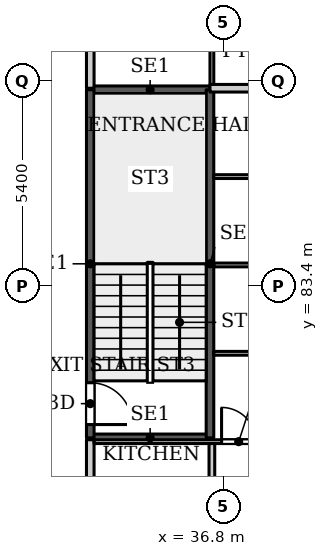
"""IFC4 building model, lengths in metres.
Left out: names, types, materials, properties, quantities, classifications, styles, units other than length and angle.
Written with IfcOpenShell. Run it as: python <this file> out.ifc"""

import sys

from ifc_helpers import new_model, si_unit, direction, frame, frame_2d, origin, place, context, subcontext, project, spatial, rectangle, extrude, source, transform, mapped, element, fill, save


model = new_model("IFC4")
c1 = context("Model", 3, precision=1e-05, world=origin(), true_north=direction((0.0, 1.0)))
c2 = subcontext(c1, "Body", "Model", "MODEL_VIEW")
j1 = project(units=[si_unit("LENGTHUNIT", "METRE"), si_unit("PLANEANGLEUNIT", "RADIAN")], contexts=[c1])
p1 = place(None, origin())
s1 = spatial("IfcSite", under=j1, at=p1, CompositionType="ELEMENT")
p2 = place(p1, origin())
s2 = spatial("IfcBuilding", under=s1, at=p2, CompositionType="ELEMENT")
p3 = place(p2, frame((0.0, 0.0, 69.5)))
s3 = spatial("IfcBuildingStorey", under=s2, at=p3, CompositionType="ELEMENT", Elevation=69.5)
for number, where, z_axis, x_axis in (
    (1, (33.3, 79.4, 0.0), (0.0, 0.0, 1.0), (1.0, 0.0, 0.0)),
    (2, (33.3, 88.56, 0.0), (0.0, 0.0, 1.0), (1.0, 0.0, 0.0)),
):
    element("IfcWall", number, at=place(p3, frame(where, z_axis=z_axis, x_axis=x_axis)), inside=s3, PredefinedType="SHEAR", context=c2, shape_type="SweptSolid", body=[
        extrude(rectangle(XDim=3.15, YDim=0.2, at=frame_2d((1.575, 0.0))), origin(), (0.0, 0.0, 1.0), 3.9),
    ])
p4 = place(p3, frame((33.3, 79.4, 0.0), z_axis=(0.0, 0.0, 1.0), x_axis=(0.0, 1.0, 0.0)))
e3 = element("IfcWall", 3, at=p4, inside=s3, PredefinedType="SHEAR", context=c2, shape_type="SweptSolid", body=[
    extrude(rectangle(XDim=9.16, YDim=0.2, at=frame_2d((4.58, 0.0))), origin(), (0.0, 0.0, 1.0), 3.9),
])
p5 = place(p4, frame((0.35, 0.0, 0.0)))
e4 = element("IfcOpeningElement", 4, at=p5, cuts=e3, PredefinedType="OPENING", context=c2, shape_type="SweptSolid", body=[
    extrude(rectangle(XDim=1.1, YDim=2.2, at=frame_2d((0.55, 1.1))), frame((0.0, 0.11, 0.0), z_axis=(0.0, -1.0, 0.0), x_axis=(1.0, 0.0, 0.0)), (0.0, 0.0, 1.0), 0.22),
])
p6 = place(p3, frame((36.45, 79.4, 0.0), z_axis=(0.0, 0.0, 1.0), x_axis=(0.0, 1.0, 0.0)))
e5 = element("IfcWall", 5, at=p6, inside=s3, PredefinedType="SHEAR", context=c2, shape_type="SweptSolid", body=[
    extrude(rectangle(XDim=9.16, YDim=0.2, at=frame_2d((4.58, 0.0))), origin(), (0.0, 0.0, 1.0), 3.9),
])
p7 = place(p3, frame((33.3, 54.4, 0.0), z_axis=(0.0, 0.0, 1.0), x_axis=(0.0, 1.0, 0.0)))
e6 = element("IfcWall", 6, at=p7, inside=s3, PredefinedType="PARTITIONING", context=c2, shape_type="SweptSolid", body=[
    extrude(rectangle(XDim=24.95, YDim=0.2, at=frame_2d((12.475, 0.0))), origin(), (0.0, 0.0, 1.0), 3.6),
])
p8 = place(p7, frame((3.4, 0.0, 0.0)))
e7 = element("IfcOpeningElement", 7, at=p8, cuts=e6, PredefinedType="OPENING", context=c2, shape_type="SweptSolid", body=[
    extrude(rectangle(XDim=1.0, YDim=2.1, at=frame_2d((0.5, 1.05))), frame((0.0, 0.11, 0.0), z_axis=(0.0, -1.0, 0.0), x_axis=(1.0, 0.0, 0.0)), (0.0, 0.0, 1.0), 0.22),
])
p9 = place(p3, frame((33.3, 88.6, 0.0), z_axis=(0.0, 0.0, 1.0), x_axis=(0.0, 1.0, 0.0)))
e8 = element("IfcWall", 8, at=p9, inside=s3, PredefinedType="PARTITIONING", context=c2, shape_type="SweptSolid", body=[
    extrude(rectangle(XDim=5.175, YDim=0.2, at=frame_2d((2.587, 0.0))), origin(), (0.0, 0.0, 1.0), 3.6),
])
p10 = place(p9, frame((3.7, 0.0, 0.0)))
e9 = element("IfcOpeningElement", 9, at=p10, cuts=e8, PredefinedType="OPENING", context=c2, shape_type="SweptSolid", body=[
    extrude(rectangle(XDim=1.0, YDim=2.1, at=frame_2d((0.5, 1.05))), frame((0.0, 0.11, 0.0), z_axis=(0.0, -1.0, 0.0), x_axis=(1.0, 0.0, 0.0)), (0.0, 0.0, 1.0), 0.22),
])
p11 = place(p3, frame((33.4, 79.3, 0.0), z_axis=(0.0, 0.0, 1.0), x_axis=(1.0, 0.0, 0.0)))
e10 = element("IfcWall", 10, at=p11, inside=s3, PredefinedType="PARTITIONING", context=c2, shape_type="SweptSolid", body=[
    extrude(rectangle(XDim=12.5, YDim=0.1, at=frame_2d((6.25, 0.0))), origin(), (0.0, 0.0, 1.0), 3.6),
])
p12 = place(p11, frame((3.355, 0.0, 0.0)))
e11 = element("IfcOpeningElement", 11, at=p12, cuts=e10, PredefinedType="OPENING", context=c2, shape_type="SweptSolid", body=[
    extrude(rectangle(XDim=0.9, YDim=2.1, at=frame_2d((0.45, 1.05))), frame((0.0, 0.06, 0.0), z_axis=(0.0, -1.0, 0.0), x_axis=(1.0, 0.0, 0.0)), (0.0, 0.0, 1.0), 0.12),
])
p13 = place(p3, frame((36.45, 88.6, 0.0), z_axis=(0.0, 0.0, 1.0), x_axis=(1.0, 0.0, 0.0)))
e12 = element("IfcWall", 12, at=p13, inside=s3, PredefinedType="PARTITIONING", context=c2, shape_type="SweptSolid", body=[
    extrude(rectangle(XDim=9.45, YDim=0.2, at=frame_2d((4.725, 0.0))), origin(), (0.0, 0.0, 1.0), 3.147),
])
p14 = place(p3, frame((36.5, 60.325, 0.0), z_axis=(0.0, 0.0, 1.0), x_axis=(0.0, 1.0, 0.0)))
e13 = element("IfcWall", 13, at=p14, inside=s3, PredefinedType="PARTITIONING", context=c2, shape_type="SweptSolid", body=[
    extrude(rectangle(XDim=18.925, YDim=0.15, at=frame_2d((9.462, 0.0))), origin(), (0.0, 0.0, 1.0), 3.6),
])
p15 = place(p14, frame((8.075, 0.0, 0.0)))
e14 = element("IfcOpeningElement", 14, at=p15, cuts=e13, PredefinedType="OPENING", context=c2, shape_type="SweptSolid", body=[
    extrude(rectangle(XDim=0.8, YDim=2.1, at=frame_2d((0.4, 1.05))), frame((0.0, 0.085, 0.0), z_axis=(0.0, -1.0, 0.0), x_axis=(1.0, 0.0, 0.0)), (0.0, 0.0, 1.0), 0.17),
])
p16 = place(p14, frame((15.425, 0.0, 0.0)))
e15 = element("IfcOpeningElement", 15, at=p16, cuts=e13, PredefinedType="OPENING", context=c2, shape_type="SweptSolid", body=[
    extrude(rectangle(XDim=0.9, YDim=2.1, at=frame_2d((0.45, 1.05))), frame((0.0, 0.085, 0.0), z_axis=(0.0, -1.0, 0.0), x_axis=(1.0, 0.0, 0.0)), (0.0, 0.0, 1.0), 0.17),
])
p17 = place(p14, frame((12.275, 0.0, 0.0)))
e16 = element("IfcOpeningElement", 16, at=p17, cuts=e13, PredefinedType="OPENING", context=c2, shape_type="SweptSolid", body=[
    extrude(rectangle(XDim=0.8, YDim=2.1, at=frame_2d((0.4, 1.05))), frame((0.0, 0.085, 0.0), z_axis=(0.0, -1.0, 0.0), x_axis=(1.0, 0.0, 0.0)), (0.0, 0.0, 1.0), 0.17),
])
p18 = place(p14, frame((1.675, 0.0, 0.0)))
e17 = element("IfcOpeningElement", 17, at=p18, cuts=e13, PredefinedType="OPENING", context=c2, shape_type="SweptSolid", body=[
    extrude(rectangle(XDim=0.8, YDim=2.1, at=frame_2d((0.4, 1.05))), frame((0.0, 0.085, 0.0), z_axis=(0.0, -1.0, 0.0), x_axis=(1.0, 0.0, 0.0)), (0.0, 0.0, 1.0), 0.17),
])
p19 = place(p3, frame((36.5, 88.7, 0.0), z_axis=(0.0, 0.0, 1.0), x_axis=(0.0, 1.0, 0.0)))
e18 = element("IfcWall", 18, at=p19, inside=s3, PredefinedType="PARTITIONING", context=c2, shape_type="SweptSolid", body=[
    extrude(rectangle(XDim=3.25, YDim=0.1, at=frame_2d((1.625, 0.0))), origin(), (0.0, 0.0, 1.0), 3.6),
])
p20 = place(p19, frame((1.1, 0.0, 0.0)))
e19 = element("IfcOpeningElement", 19, at=p20, cuts=e18, PredefinedType="OPENING", context=c2, shape_type="SweptSolid", body=[
    extrude(rectangle(XDim=0.9, YDim=2.1, at=frame_2d((0.45, 1.05))), frame((0.0, 0.06, 0.0), z_axis=(0.0, -1.0, 0.0), x_axis=(1.0, 0.0, 0.0)), (0.0, 0.0, 1.0), 0.12),
])
p21 = place(p3, frame((36.549, 81.625, 0.0), z_axis=(0.0, 0.0, 1.0), x_axis=(1.0, 0.0, 0.0)))
e20 = element("IfcWall", 20, at=p21, inside=s3, PredefinedType="PARTITIONING", context=c2, shape_type="SweptSolid", body=[
    extrude(rectangle(XDim=9.351, YDim=0.1, at=frame_2d((4.675, 0.0))), origin(), (0.0, 0.0, 1.0), 3.6),
])
p22 = place(p21, frame((4.176, 0.0, 0.0)))
e21 = element("IfcOpeningElement", 21, at=p22, cuts=e20, PredefinedType="OPENING", context=c2, shape_type="SweptSolid", body=[
    extrude(rectangle(XDim=0.9, YDim=2.1, at=frame_2d((0.45, 1.05))), frame((0.0, 0.06, 0.0), z_axis=(0.0, -1.0, 0.0), x_axis=(1.0, 0.0, 0.0)), (0.0, 0.0, 1.0), 0.12),
])
p23 = place(p3, frame((36.549, 83.95, 0.0), z_axis=(0.0, 0.0, 1.0), x_axis=(1.0, 0.0, 0.0)))
e22 = element("IfcWall", 22, at=p23, inside=s3, PredefinedType="PARTITIONING", context=c2, shape_type="SweptSolid", body=[
    extrude(rectangle(XDim=9.351, YDim=0.1, at=frame_2d((4.675, 0.0))), origin(), (0.0, 0.0, 1.0), 3.6),
])
p24 = place(p23, frame((4.176, 0.0, 0.0)))
e23 = element("IfcOpeningElement", 23, at=p24, cuts=e22, PredefinedType="OPENING", context=c2, shape_type="SweptSolid", body=[
    extrude(rectangle(XDim=0.9, YDim=2.1, at=frame_2d((0.45, 1.05))), frame((0.0, 0.06, 0.0), z_axis=(0.0, -1.0, 0.0), x_axis=(1.0, 0.0, 0.0)), (0.0, 0.0, 1.0), 0.12),
])
p25 = place(p3, frame((36.549, 86.275, 0.0), z_axis=(0.0, 0.0, 1.0), x_axis=(1.0, 0.0, 0.0)))
e24 = element("IfcWall", 24, at=p25, inside=s3, PredefinedType="PARTITIONING", context=c2, shape_type="SweptSolid", body=[
    extrude(rectangle(XDim=9.351, YDim=0.1, at=frame_2d((4.675, 0.0))), origin(), (0.0, 0.0, 1.0), 3.6),
])
p26 = place(p25, frame((4.176, 0.0, 0.0)))
e25 = element("IfcOpeningElement", 25, at=p26, cuts=e24, PredefinedType="OPENING", context=c2, shape_type="SweptSolid", body=[
    extrude(rectangle(XDim=0.9, YDim=2.1, at=frame_2d((0.45, 1.05))), frame((0.0, 0.06, 0.0), z_axis=(0.0, -1.0, 0.0), x_axis=(1.0, 0.0, 0.0)), (0.0, 0.0, 1.0), 0.12),
])
m1 = source(origin(), c2, "Body", "SweptSolid", [
    extrude(rectangle(XDim=1.1, YDim=2.2, at=frame_2d((0.55, 1.1))), frame((0.0, 0.025, 0.0), z_axis=(0.0, -1.0, 0.0), x_axis=(1.0, 0.0, 0.0)), (0.0, 0.0, 1.0), 0.05),
])
p27 = place(p5, origin())
e26 = element("IfcDoor", 26, at=p27, inside=s3, OperationType="SINGLE_SWING_RIGHT", PredefinedType="DOOR", context=c2, shape_type="MappedRepresentation", body=[
    mapped(m1, transform((0.0, 0.0, 0.0), x_axis=(1.0, 0.0, 0.0), y_axis=(0.0, 1.0, 0.0), z_axis=(0.0, 0.0, 1.0), scale=1.0)),
])
fill(e4, e26)
m2 = source(origin(), c2, "Body", "SweptSolid", [
    extrude(rectangle(XDim=0.9, YDim=2.1, at=frame_2d((0.45, 1.05))), frame((0.0, 0.025, 0.0), z_axis=(0.0, -1.0, 0.0), x_axis=(1.0, 0.0, 0.0)), (0.0, 0.0, 1.0), 0.05),
])
p28 = place(p12, origin())
e27 = element("IfcDoor", 27, at=p28, inside=s3, OperationType="SINGLE_SWING_LEFT", PredefinedType="DOOR", context=c2, shape_type="MappedRepresentation", body=[
    mapped(m2, transform((0.0, 0.0, 0.0), x_axis=(1.0, 0.0, 0.0), y_axis=(0.0, 1.0, 0.0), z_axis=(0.0, 0.0, 1.0), scale=1.0)),
])
fill(e11, e27)
save(model, sys.argv[1])
